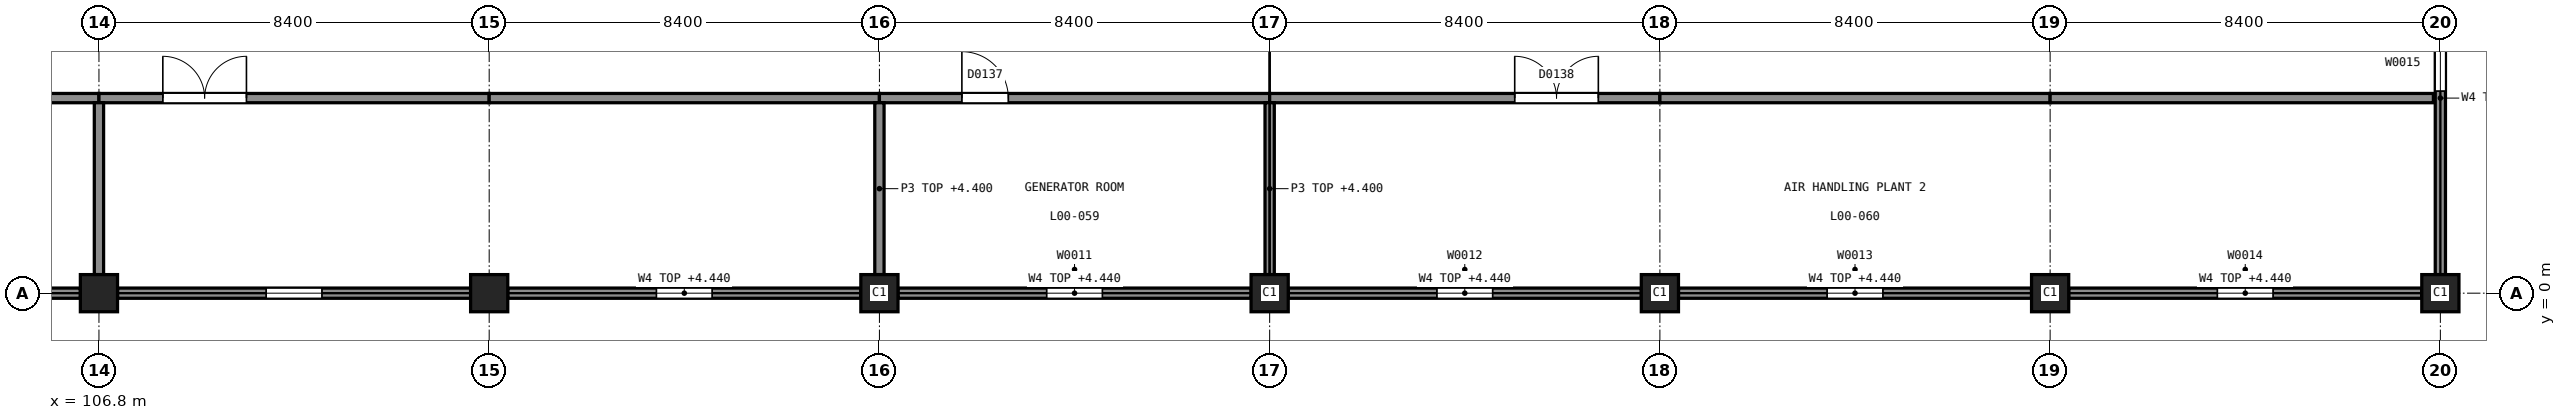
"""IFC4 building model, lengths in metres.
Left out: names, types, materials, properties, quantities, classifications, styles, units other than length and angle.
Written with IfcOpenShell. Run it as: python <this file> out.ifc"""

import sys

from ifc_helpers import new_model, si_unit, direction, frame, frame_2d, origin, origin_2d, place, context, subcontext, project, spatial, rectangle, extrude, element, fill, save


model = new_model("IFC4")
c1 = context("Model", 3, precision=1e-05, world=origin(), true_north=direction((0.0, 1.0)))
c2 = subcontext(c1, "Body", "Model", "MODEL_VIEW")
j1 = project(units=[si_unit("LENGTHUNIT", "METRE"), si_unit("PLANEANGLEUNIT", "RADIAN")], contexts=[c1])
p1 = place(None, origin())
s1 = spatial("IfcSite", under=j1, at=p1, CompositionType="ELEMENT")
p2 = place(p1, origin())
s2 = spatial("IfcBuilding", under=s1, at=p2, CompositionType="ELEMENT")
p3 = place(p2, origin())
s3 = spatial("IfcBuildingStorey", under=s2, at=p3, CompositionType="ELEMENT", Elevation=0.0)
for number, where, z_axis, x_axis in (
    (1, (106.8, 0.0, -0.3), (0.0, 0.0, 1.0), (1.0, 0.0, 0.0)),
    (2, (115.2, 0.0, -0.3), (0.0, 0.0, 1.0), (1.0, 0.0, 0.0)),
    (3, (123.6, 0.0, -0.3), (0.0, 0.0, 1.0), (1.0, 0.0, 0.0)),
    (4, (132.0, 0.0, -0.3), (0.0, 0.0, 1.0), (1.0, 0.0, 0.0)),
    (5, (140.4, 0.0, -0.3), (0.0, 0.0, 1.0), (1.0, 0.0, 0.0)),
    (6, (148.8, 0.0, -0.3), (0.0, 0.0, 1.0), (1.0, 0.0, 0.0)),
    (7, (157.2, 0.0, -0.3), (0.0, 0.0, 1.0), (1.0, 0.0, 0.0)),
):
    element("IfcColumn", number, at=place(p3, frame(where, z_axis=z_axis, x_axis=x_axis)), inside=s3, PredefinedType="COLUMN", context=c2, shape_type="SweptSolid", body=[
        extrude(rectangle(XDim=0.8, YDim=0.8, at=origin_2d()), origin(), (0.0, 0.0, 1.0), 5.8),
    ])
p4 = place(p3, frame((98.8, 0.0, 0.0), z_axis=(0.0, 0.0, 1.0), x_axis=(1.0, 0.0, 0.0)))
e8 = element("IfcWall", 8, at=p4, inside=s3, PredefinedType="SOLIDWALL", context=c2, shape_type="SweptSolid", body=[
    extrude(rectangle(XDim=7.6, YDim=0.22, at=frame_2d((3.8, 0.0))), origin(), (0.0, 0.0, 1.0), 4.44),
])
p5 = place(p4, frame((3.2, 0.0, 2.1)))
e9 = element("IfcOpeningElement", 9, at=p5, cuts=e8, PredefinedType="OPENING", context=c2, shape_type="SweptSolid", body=[
    extrude(rectangle(XDim=1.2, YDim=0.6, at=frame_2d((0.6, 0.3))), frame((0.0, 0.12, 0.0), z_axis=(0.0, -1.0, 0.0), x_axis=(1.0, 0.0, 0.0)), (0.0, 0.0, 1.0), 0.24),
])
p6 = place(p3, frame((107.2, 0.0, 0.0), z_axis=(0.0, 0.0, 1.0), x_axis=(1.0, 0.0, 0.0)))
e10 = element("IfcWall", 10, at=p6, inside=s3, PredefinedType="SOLIDWALL", context=c2, shape_type="SweptSolid", body=[
    extrude(rectangle(XDim=7.6, YDim=0.22, at=frame_2d((3.8, 0.0))), origin(), (0.0, 0.0, 1.0), 4.44),
])
p7 = place(p6, frame((3.2, 0.0, 2.1)))
e11 = element("IfcOpeningElement", 11, at=p7, cuts=e10, PredefinedType="OPENING", context=c2, shape_type="SweptSolid", body=[
    extrude(rectangle(XDim=1.2, YDim=0.6, at=frame_2d((0.6, 0.3))), frame((0.0, 0.12, 0.0), z_axis=(0.0, -1.0, 0.0), x_axis=(1.0, 0.0, 0.0)), (0.0, 0.0, 1.0), 0.24),
])
p8 = place(p3, frame((115.6, 0.0, 0.0), z_axis=(0.0, 0.0, 1.0), x_axis=(1.0, 0.0, 0.0)))
e12 = element("IfcWall", 12, at=p8, inside=s3, PredefinedType="SOLIDWALL", context=c2, shape_type="SweptSolid", body=[
    extrude(rectangle(XDim=7.6, YDim=0.22, at=frame_2d((3.8, 0.0))), origin(), (0.0, 0.0, 1.0), 4.44),
])
p9 = place(p8, frame((3.2, 0.0, 2.1)))
e13 = element("IfcOpeningElement", 13, at=p9, cuts=e12, PredefinedType="OPENING", context=c2, shape_type="SweptSolid", body=[
    extrude(rectangle(XDim=1.2, YDim=0.6, at=frame_2d((0.6, 0.3))), frame((0.0, 0.12, 0.0), z_axis=(0.0, -1.0, 0.0), x_axis=(1.0, 0.0, 0.0)), (0.0, 0.0, 1.0), 0.24),
])
p10 = place(p3, frame((124.0, 0.0, 0.0), z_axis=(0.0, 0.0, 1.0), x_axis=(1.0, 0.0, 0.0)))
e14 = element("IfcWall", 14, at=p10, inside=s3, PredefinedType="SOLIDWALL", context=c2, shape_type="SweptSolid", body=[
    extrude(rectangle(XDim=7.6, YDim=0.22, at=frame_2d((3.8, 0.0))), origin(), (0.0, 0.0, 1.0), 4.44),
])
p11 = place(p10, frame((3.2, 0.0, 2.1)))
e15 = element("IfcOpeningElement", 15, at=p11, cuts=e14, PredefinedType="OPENING", context=c2, shape_type="SweptSolid", body=[
    extrude(rectangle(XDim=1.2, YDim=0.6, at=frame_2d((0.6, 0.3))), frame((0.0, 0.12, 0.0), z_axis=(0.0, -1.0, 0.0), x_axis=(1.0, 0.0, 0.0)), (0.0, 0.0, 1.0), 0.24),
])
p12 = place(p3, frame((132.4, 0.0, 0.0), z_axis=(0.0, 0.0, 1.0), x_axis=(1.0, 0.0, 0.0)))
e16 = element("IfcWall", 16, at=p12, inside=s3, PredefinedType="SOLIDWALL", context=c2, shape_type="SweptSolid", body=[
    extrude(rectangle(XDim=7.6, YDim=0.22, at=frame_2d((3.8, 0.0))), origin(), (0.0, 0.0, 1.0), 4.44),
])
p13 = place(p12, frame((3.2, 0.0, 2.1)))
e17 = element("IfcOpeningElement", 17, at=p13, cuts=e16, PredefinedType="OPENING", context=c2, shape_type="SweptSolid", body=[
    extrude(rectangle(XDim=1.2, YDim=0.6, at=frame_2d((0.6, 0.3))), frame((0.0, 0.12, 0.0), z_axis=(0.0, -1.0, 0.0), x_axis=(1.0, 0.0, 0.0)), (0.0, 0.0, 1.0), 0.24),
])
p14 = place(p3, frame((140.8, 0.0, 0.0), z_axis=(0.0, 0.0, 1.0), x_axis=(1.0, 0.0, 0.0)))
e18 = element("IfcWall", 18, at=p14, inside=s3, PredefinedType="SOLIDWALL", context=c2, shape_type="SweptSolid", body=[
    extrude(rectangle(XDim=7.6, YDim=0.22, at=frame_2d((3.8, 0.0))), origin(), (0.0, 0.0, 1.0), 4.44),
])
p15 = place(p14, frame((3.2, 0.0, 2.1)))
e19 = element("IfcOpeningElement", 19, at=p15, cuts=e18, PredefinedType="OPENING", context=c2, shape_type="SweptSolid", body=[
    extrude(rectangle(XDim=1.2, YDim=0.6, at=frame_2d((0.6, 0.3))), frame((0.0, 0.12, 0.0), z_axis=(0.0, -1.0, 0.0), x_axis=(1.0, 0.0, 0.0)), (0.0, 0.0, 1.0), 0.24),
])
p16 = place(p3, frame((149.2, 0.0, 0.0), z_axis=(0.0, 0.0, 1.0), x_axis=(1.0, 0.0, 0.0)))
e20 = element("IfcWall", 20, at=p16, inside=s3, PredefinedType="SOLIDWALL", context=c2, shape_type="SweptSolid", body=[
    extrude(rectangle(XDim=7.6, YDim=0.22, at=frame_2d((3.8, 0.0))), origin(), (0.0, 0.0, 1.0), 4.44),
])
p17 = place(p16, frame((3.2, 0.0, 2.1)))
e21 = element("IfcOpeningElement", 21, at=p17, cuts=e20, PredefinedType="OPENING", context=c2, shape_type="SweptSolid", body=[
    extrude(rectangle(XDim=1.2, YDim=0.6, at=frame_2d((0.6, 0.3))), frame((0.0, 0.12, 0.0), z_axis=(0.0, -1.0, 0.0), x_axis=(1.0, 0.0, 0.0)), (0.0, 0.0, 1.0), 0.24),
])
p18 = place(p3, frame((157.2, 0.4, 0.0), z_axis=(0.0, 0.0, 1.0), x_axis=(0.0, 1.0, 0.0)))
e22 = element("IfcWall", 22, at=p18, inside=s3, PredefinedType="SOLIDWALL", context=c2, shape_type="SweptSolid", body=[
    extrude(rectangle(XDim=7.6, YDim=0.22, at=frame_2d((3.8, 0.0))), origin(), (0.0, 0.0, 1.0), 4.44),
])
p19 = place(p18, frame((3.95, 0.0, 2.1)))
e23 = element("IfcOpeningElement", 23, at=p19, cuts=e22, PredefinedType="OPENING", context=c2, shape_type="SweptSolid", body=[
    extrude(rectangle(XDim=1.2, YDim=0.6, at=frame_2d((0.6, 0.3))), frame((0.0, 0.12, 0.0), z_axis=(0.0, -1.0, 0.0), x_axis=(1.0, 0.0, 0.0)), (0.0, 0.0, 1.0), 0.24),
])
p20 = place(p3, frame((98.4, 4.2, 0.0), z_axis=(0.0, 0.0, 1.0), x_axis=(1.0, 0.0, 0.0)))
e24 = element("IfcWall", 24, at=p20, inside=s3, PredefinedType="PARTITIONING", context=c2, shape_type="SweptSolid", body=[
    extrude(rectangle(XDim=8.4, YDim=0.2, at=frame_2d((4.2, 0.0))), origin(), (0.0, 0.0, 1.0), 4.4),
])
p21 = place(p20, frame((5.625, 0.0, 0.0)))
e25 = element("IfcOpeningElement", 25, at=p21, cuts=e24, PredefinedType="OPENING", context=c2, shape_type="SweptSolid", body=[
    extrude(rectangle(XDim=1.0, YDim=2.1, at=frame_2d((0.5, 1.05))), frame((0.0, 0.11, 0.0), z_axis=(0.0, -1.0, 0.0), x_axis=(1.0, 0.0, 0.0)), (0.0, 0.0, 1.0), 0.22),
])
p22 = place(p3, frame((106.8, 4.2, 0.0), z_axis=(0.0, 0.0, 1.0), x_axis=(1.0, 0.0, 0.0)))
e26 = element("IfcWall", 26, at=p22, inside=s3, PredefinedType="PARTITIONING", context=c2, shape_type="SweptSolid", body=[
    extrude(rectangle(XDim=8.4, YDim=0.2, at=frame_2d((4.2, 0.0))), origin(), (0.0, 0.0, 1.0), 4.4),
])
p23 = place(p22, frame((1.375, 0.0, 0.0)))
e27 = element("IfcOpeningElement", 27, at=p23, cuts=e26, PredefinedType="OPENING", context=c2, shape_type="SweptSolid", body=[
    extrude(rectangle(XDim=1.8, YDim=2.1, at=frame_2d((0.9, 1.05))), frame((0.0, 0.11, 0.0), z_axis=(0.0, -1.0, 0.0), x_axis=(1.0, 0.0, 0.0)), (0.0, 0.0, 1.0), 0.22),
])
p24 = place(p3, frame((115.2, 4.2, 0.0), z_axis=(0.0, 0.0, 1.0), x_axis=(1.0, 0.0, 0.0)))
e28 = element("IfcWall", 28, at=p24, inside=s3, PredefinedType="PARTITIONING", context=c2, shape_type="SweptSolid", body=[
    extrude(rectangle(XDim=8.4, YDim=0.2, at=frame_2d((4.2, 0.0))), origin(), (0.0, 0.0, 1.0), 4.4),
])
p25 = place(p3, frame((123.6, 4.2, 0.0), z_axis=(0.0, 0.0, 1.0), x_axis=(1.0, 0.0, 0.0)))
e29 = element("IfcWall", 29, at=p25, inside=s3, PredefinedType="PARTITIONING", context=c2, shape_type="SweptSolid", body=[
    extrude(rectangle(XDim=8.4, YDim=0.2, at=frame_2d((4.2, 0.0))), origin(), (0.0, 0.0, 1.0), 4.4),
])
p26 = place(p25, frame((1.775, 0.0, 0.0)))
e30 = element("IfcOpeningElement", 30, at=p26, cuts=e29, PredefinedType="OPENING", context=c2, shape_type="SweptSolid", body=[
    extrude(rectangle(XDim=1.0, YDim=2.1, at=frame_2d((0.5, 1.05))), frame((0.0, 0.11, 0.0), z_axis=(0.0, -1.0, 0.0), x_axis=(1.0, 0.0, 0.0)), (0.0, 0.0, 1.0), 0.22),
])
p27 = place(p3, frame((132.0, 4.2, 0.0), z_axis=(0.0, 0.0, 1.0), x_axis=(1.0, 0.0, 0.0)))
e31 = element("IfcWall", 31, at=p27, inside=s3, PredefinedType="PARTITIONING", context=c2, shape_type="SweptSolid", body=[
    extrude(rectangle(XDim=8.4, YDim=0.2, at=frame_2d((4.2, 0.0))), origin(), (0.0, 0.0, 1.0), 4.4),
])
p28 = place(p27, frame((5.275, 0.0, 0.0)))
e32 = element("IfcOpeningElement", 32, at=p28, cuts=e31, PredefinedType="OPENING", context=c2, shape_type="SweptSolid", body=[
    extrude(rectangle(XDim=1.8, YDim=2.1, at=frame_2d((0.9, 1.05))), frame((0.0, 0.11, 0.0), z_axis=(0.0, -1.0, 0.0), x_axis=(1.0, 0.0, 0.0)), (0.0, 0.0, 1.0), 0.22),
])
p29 = place(p3, frame((140.4, 4.2, 0.0), z_axis=(0.0, 0.0, 1.0), x_axis=(1.0, 0.0, 0.0)))
e33 = element("IfcWall", 33, at=p29, inside=s3, PredefinedType="PARTITIONING", context=c2, shape_type="SweptSolid", body=[
    extrude(rectangle(XDim=8.4, YDim=0.2, at=frame_2d((4.2, 0.0))), origin(), (0.0, 0.0, 1.0), 4.4),
])
p30 = place(p3, frame((148.8, 4.2, 0.0), z_axis=(0.0, 0.0, 1.0), x_axis=(1.0, 0.0, 0.0)))
e34 = element("IfcWall", 34, at=p30, inside=s3, PredefinedType="PARTITIONING", context=c2, shape_type="SweptSolid", body=[
    extrude(rectangle(XDim=8.25, YDim=0.2, at=frame_2d((4.125, 0.0))), origin(), (0.0, 0.0, 1.0), 4.4),
])
for number, where, z_axis, x_axis in (
    (35, (106.8, 0.4, 0.0), (0.0, 0.0, 1.0), (0.0, 1.0, 0.0)),
    (36, (123.6, 0.4, 0.0), (0.0, 0.0, 1.0), (0.0, 1.0, 0.0)),
    (37, (132.0, 0.4, 0.0), (0.0, 0.0, 1.0), (0.0, 1.0, 0.0)),
):
    element("IfcWall", number, at=place(p3, frame(where, z_axis=z_axis, x_axis=x_axis)), inside=s3, PredefinedType="PARTITIONING", context=c2, shape_type="SweptSolid", body=[
        extrude(rectangle(XDim=3.7, YDim=0.2, at=frame_2d((1.85, 0.0))), origin(), (0.0, 0.0, 1.0), 4.4),
    ])
p31 = place(p7, origin())
e38 = element("IfcWindow", 38, at=p31, inside=s3, PartitioningType="SINGLE_PANEL", PredefinedType="WINDOW", context=c2, shape_type="SweptSolid", body=[
    extrude(rectangle(XDim=1.2, YDim=0.6, at=frame_2d((0.6, 0.3))), frame((0.0, 0.09, 0.0), z_axis=(0.0, -1.0, 0.0), x_axis=(1.0, 0.0, 0.0)), (0.0, 0.0, 1.0), 0.06),
])
fill(e11, e38)
p32 = place(p9, origin())
e39 = element("IfcWindow", 39, at=p32, inside=s3, PartitioningType="SINGLE_PANEL", PredefinedType="WINDOW", context=c2, shape_type="SweptSolid", body=[
    extrude(rectangle(XDim=1.2, YDim=0.6, at=frame_2d((0.6, 0.3))), frame((0.0, 0.09, 0.0), z_axis=(0.0, -1.0, 0.0), x_axis=(1.0, 0.0, 0.0)), (0.0, 0.0, 1.0), 0.06),
])
fill(e13, e39)
p33 = place(p11, origin())
e40 = element("IfcWindow", 40, at=p33, inside=s3, PartitioningType="SINGLE_PANEL", PredefinedType="WINDOW", context=c2, shape_type="SweptSolid", body=[
    extrude(rectangle(XDim=1.2, YDim=0.6, at=frame_2d((0.6, 0.3))), frame((0.0, 0.09, 0.0), z_axis=(0.0, -1.0, 0.0), x_axis=(1.0, 0.0, 0.0)), (0.0, 0.0, 1.0), 0.06),
])
fill(e15, e40)
p34 = place(p13, origin())
e41 = element("IfcWindow", 41, at=p34, inside=s3, PartitioningType="SINGLE_PANEL", PredefinedType="WINDOW", context=c2, shape_type="SweptSolid", body=[
    extrude(rectangle(XDim=1.2, YDim=0.6, at=frame_2d((0.6, 0.3))), frame((0.0, 0.09, 0.0), z_axis=(0.0, -1.0, 0.0), x_axis=(1.0, 0.0, 0.0)), (0.0, 0.0, 1.0), 0.06),
])
fill(e17, e41)
p35 = place(p15, origin())
e42 = element("IfcWindow", 42, at=p35, inside=s3, PartitioningType="SINGLE_PANEL", PredefinedType="WINDOW", context=c2, shape_type="SweptSolid", body=[
    extrude(rectangle(XDim=1.2, YDim=0.6, at=frame_2d((0.6, 0.3))), frame((0.0, 0.09, 0.0), z_axis=(0.0, -1.0, 0.0), x_axis=(1.0, 0.0, 0.0)), (0.0, 0.0, 1.0), 0.06),
])
fill(e19, e42)
p36 = place(p17, origin())
e43 = element("IfcWindow", 43, at=p36, inside=s3, PartitioningType="SINGLE_PANEL", PredefinedType="WINDOW", context=c2, shape_type="SweptSolid", body=[
    extrude(rectangle(XDim=1.2, YDim=0.6, at=frame_2d((0.6, 0.3))), frame((0.0, 0.09, 0.0), z_axis=(0.0, -1.0, 0.0), x_axis=(1.0, 0.0, 0.0)), (0.0, 0.0, 1.0), 0.06),
])
fill(e21, e43)
p37 = place(p19, origin())
e44 = element("IfcWindow", 44, at=p37, inside=s3, PartitioningType="SINGLE_PANEL", PredefinedType="WINDOW", context=c2, shape_type="SweptSolid", body=[
    extrude(rectangle(XDim=1.2, YDim=0.6, at=frame_2d((0.6, 0.3))), frame((0.0, 0.09, 0.0), z_axis=(0.0, -1.0, 0.0), x_axis=(1.0, 0.0, 0.0)), (0.0, 0.0, 1.0), 0.06),
])
fill(e23, e44)
p38 = place(p23, origin())
e45 = element("IfcDoor", 45, at=p38, inside=s3, OperationType="DOUBLE_DOOR_SINGLE_SWING", PredefinedType="DOOR", context=c2, shape_type="SweptSolid", body=[
    extrude(rectangle(XDim=1.8, YDim=2.1, at=frame_2d((0.9, 1.05))), frame((0.0, 0.025, 0.0), z_axis=(0.0, -1.0, 0.0), x_axis=(1.0, 0.0, 0.0)), (0.0, 0.0, 1.0), 0.05),
])
fill(e27, e45)
p39 = place(p26, origin())
e46 = element("IfcDoor", 46, at=p39, inside=s3, OperationType="SINGLE_SWING_RIGHT", PredefinedType="DOOR", context=c2, shape_type="SweptSolid", body=[
    extrude(rectangle(XDim=1.0, YDim=2.1, at=frame_2d((0.5, 1.05))), frame((0.0, 0.025, 0.0), z_axis=(0.0, -1.0, 0.0), x_axis=(1.0, 0.0, 0.0)), (0.0, 0.0, 1.0), 0.05),
])
fill(e30, e46)
p40 = place(p28, origin())
e47 = element("IfcDoor", 47, at=p40, inside=s3, OperationType="DOUBLE_DOOR_SINGLE_SWING", PredefinedType="DOOR", context=c2, shape_type="SweptSolid", body=[
    extrude(rectangle(XDim=1.8, YDim=2.1, at=frame_2d((0.9, 1.05))), frame((0.0, 0.025, 0.0), z_axis=(0.0, -1.0, 0.0), x_axis=(1.0, 0.0, 0.0)), (0.0, 0.0, 1.0), 0.05),
])
fill(e32, e47)
save(model, sys.argv[1])
